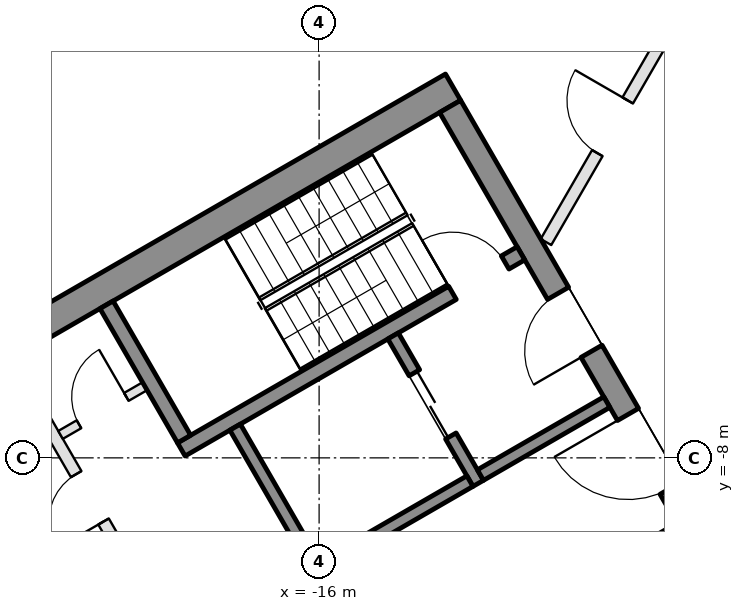
"""IFC4 building model, lengths in metres.
Left out: names, types, materials, properties, quantities, classifications, styles, units other than length and angle.
Written with IfcOpenShell. Run it as: python <this file> out.ifc"""

import sys

from ifc_helpers import new_model, si_unit, direction, frame, frame_2d, origin, place, context, subcontext, project, spatial, rectangle, extrude, element, fill, save


model = new_model("IFC4")
c1 = context("Model", 3, precision=1e-05, world=origin(), true_north=direction((0.0, 1.0)))
c2 = subcontext(c1, "Body", "Model", "MODEL_VIEW")
j1 = project(units=[si_unit("LENGTHUNIT", "METRE"), si_unit("PLANEANGLEUNIT", "RADIAN")], contexts=[c1])
p1 = place(None, origin())
s1 = spatial("IfcSite", under=j1, at=p1, CompositionType="ELEMENT")
p2 = place(p1, origin())
s2 = spatial("IfcBuilding", under=s1, at=p2, CompositionType="ELEMENT")
p3 = place(p2, frame((0.0, 0.0, 72.4)))
s3 = spatial("IfcBuildingStorey", under=s2, at=p3, CompositionType="ELEMENT", Elevation=72.4)
p4 = place(p3, frame((-20.309, 1.934, 0.0), z_axis=(0.0, 0.0, 1.0), x_axis=(-0.499992114976, -0.866029956157, 0.0)))
e1 = element("IfcWall", 1, at=p4, inside=s3, PredefinedType="SOLIDWALL", context=c2, shape_type="SweptSolid", body=[
    extrude(rectangle(XDim=6.74, YDim=0.35, at=frame_2d((3.37, 0.0))), origin(), (0.0, 0.0, 1.0), 3.55),
])
p5 = place(p4, frame((0.32, 0.0, 0.0)))
e2 = element("IfcOpeningElement", 2, at=p5, cuts=e1, PredefinedType="OPENING", context=c2, shape_type="SweptSolid", body=[
    extrude(rectangle(XDim=2.4, YDim=2.4, at=frame_2d((1.2, 1.2))), frame((0.0, 0.185, 0.0), z_axis=(0.0, -1.0, 0.0), x_axis=(1.0, 0.0, 0.0)), (0.0, 0.0, 1.0), 0.37),
])
p6 = place(p4, frame((3.02, 0.0, 0.3)))
e3 = element("IfcOpeningElement", 3, at=p6, cuts=e1, PredefinedType="OPENING", context=c2, shape_type="SweptSolid", body=[
    extrude(rectangle(XDim=1.5, YDim=2.65, at=frame_2d((0.75, 1.325))), frame((0.0, 0.185, 0.0), z_axis=(0.0, -1.0, 0.0), x_axis=(1.0, 0.0, 0.0)), (0.0, 0.0, 1.0), 0.37),
])
p7 = place(p4, frame((4.82, 0.0, 0.3)))
e4 = element("IfcOpeningElement", 4, at=p7, cuts=e1, PredefinedType="OPENING", context=c2, shape_type="SweptSolid", body=[
    extrude(rectangle(XDim=1.5, YDim=2.65, at=frame_2d((0.75, 1.325))), frame((0.0, 0.185, 0.0), z_axis=(0.0, -1.0, 0.0), x_axis=(1.0, 0.0, 0.0)), (0.0, 0.0, 1.0), 0.37),
])
p8 = place(p3, frame((-13.797, -1.903, 0.0), z_axis=(0.0, 0.0, 1.0), x_axis=(-0.866025009528, -0.500000682871, 0.0)))
e5 = element("IfcWall", 5, at=p8, inside=s3, PredefinedType="SHEAR", context=c2, shape_type="SweptSolid", body=[
    extrude(rectangle(XDim=14.837, YDim=0.5, at=frame_2d((7.418, 0.0))), origin(), (0.0, 0.0, 1.0), 3.5),
])
p9 = place(p3, frame((-13.845, -2.22, 0.0), z_axis=(0.0, 0.0, 1.0), x_axis=(0.500004234368, -0.866022959057, 0.0)))
e6 = element("IfcWall", 6, at=p9, inside=s3, PredefinedType="SHEAR", context=c2, shape_type="SweptSolid", body=[
    extrude(rectangle(XDim=10.0, YDim=0.4, at=frame_2d((5.0, 0.0))), origin(), (0.0, 0.0, 1.0), 3.5),
])
p10 = place(p9, frame((3.55, 0.0, 0.0)))
e7 = element("IfcOpeningElement", 7, at=p10, cuts=e6, PredefinedType="OPENING", context=c2, shape_type="SweptSolid", body=[
    extrude(rectangle(XDim=1.1, YDim=2.1, at=frame_2d((0.55, 1.05))), frame((0.0, 0.21, 0.0), z_axis=(0.0, -1.0, 0.0), x_axis=(1.0, 0.0, 0.0)), (0.0, 0.0, 1.0), 0.42),
])
p11 = place(p9, frame((5.85, 0.0, 0.0)))
e8 = element("IfcOpeningElement", 8, at=p11, cuts=e6, PredefinedType="OPENING", context=c2, shape_type="SweptSolid", body=[
    extrude(rectangle(XDim=1.4, YDim=2.1, at=frame_2d((0.7, 1.05))), frame((0.0, 0.21, 0.0), z_axis=(0.0, -1.0, 0.0), x_axis=(1.0, 0.0, 0.0)), (0.0, 0.0, 1.0), 0.42),
])
p12 = place(p3, frame((-12.681, -4.636, 0.0), z_axis=(0.0, 0.0, 1.0), x_axis=(-0.866021702275, -0.500006411147, 0.0)))
e9 = element("IfcWall", 9, at=p12, inside=s3, PredefinedType="SHEAR", context=c2, shape_type="SweptSolid", body=[
    extrude(rectangle(XDim=6.45, YDim=0.25, at=frame_2d((3.225, 0.0))), origin(), (0.0, 0.0, 1.0), 3.5),
])
p13 = place(p12, frame((0.3, 0.0, 0.0)))
e10 = element("IfcOpeningElement", 10, at=p13, cuts=e9, PredefinedType="OPENING", context=c2, shape_type="SweptSolid", body=[
    extrude(rectangle(XDim=1.0, YDim=2.1, at=frame_2d((0.5, 1.05))), frame((0.0, 0.135, 0.0), z_axis=(0.0, -1.0, 0.0), x_axis=(1.0, 0.0, 0.0)), (0.0, 0.0, 1.0), 0.27),
])
p14 = place(p3, frame((-19.496, -5.482, 0.0), z_axis=(0.0, 0.0, 1.0), x_axis=(0.499990435942, -0.866030925526, 0.0)))
e11 = element("IfcWall", 11, at=p14, inside=s3, PredefinedType="SHEAR", context=c2, shape_type="SweptSolid", body=[
    extrude(rectangle(XDim=2.55, YDim=0.25, at=frame_2d((1.275, 0.0))), origin(), (0.0, 0.0, 1.0), 3.5),
])
p15 = place(p3, frame((-17.381, -7.495, 0.0), z_axis=(0.0, 0.0, 1.0), x_axis=(0.500011755427, -0.866018616679, 0.0)))
e12 = element("IfcWall", 12, at=p15, inside=s3, PredefinedType="SHEAR", context=c2, shape_type="SweptSolid", body=[
    extrude(rectangle(XDim=2.8, YDim=0.2, at=frame_2d((1.4, 0.0))), origin(), (0.0, 0.0, 1.0), 3.5),
])
p16 = place(p3, frame((-14.783, -5.995, 0.0), z_axis=(0.0, 0.0, 1.0), x_axis=(0.49994636267, -0.866056369097, 0.0)))
e13 = element("IfcWall", 13, at=p16, inside=s3, PredefinedType="SHEAR", context=c2, shape_type="SweptSolid", body=[
    extrude(rectangle(XDim=2.8, YDim=0.2, at=frame_2d((1.4, 0.0))), origin(), (0.0, 0.0, 1.0), 3.5),
])
p17 = place(p16, frame((0.7, 0.0, 0.0)))
e14 = element("IfcOpeningElement", 14, at=p17, cuts=e13, PredefinedType="OPENING", context=c2, shape_type="SweptSolid", body=[
    extrude(rectangle(XDim=1.2, YDim=2.1, at=frame_2d((0.6, 1.05))), frame((0.0, 0.11, 0.0), z_axis=(0.0, -1.0, 0.0), x_axis=(1.0, 0.0, 0.0)), (0.0, 0.0, 1.0), 0.22),
])
p18 = place(p3, frame((-13.52, -8.383, 0.0), z_axis=(0.0, 0.0, 1.0), x_axis=(-0.866034573852, -0.49998411664, 0.0)))
e15 = element("IfcWall", 15, at=p18, inside=s3, PredefinedType="SHEAR", context=c2, shape_type="SweptSolid", body=[
    extrude(rectangle(XDim=2.8, YDim=0.2, at=frame_2d((1.4, 0.0))), origin(), (0.0, 0.0, 1.0), 3.5),
])
p19 = place(p3, frame((-11.268, -7.083, 0.0), z_axis=(0.0, 0.0, 1.0), x_axis=(-0.866050077142, -0.499957262057, 0.0)))
e16 = element("IfcWall", 16, at=p19, inside=s3, PredefinedType="SHEAR", context=c2, shape_type="SweptSolid", body=[
    extrude(rectangle(XDim=2.4, YDim=0.2, at=frame_2d((1.2, 0.0))), origin(), (0.0, 0.0, 1.0), 3.5),
])
p20 = place(p3, frame((-10.068, -9.162, 0.0), z_axis=(0.0, 0.0, 1.0), x_axis=(-0.866032725843, -0.499987317609, 0.0)))
e17 = element("IfcWall", 17, at=p20, inside=s3, PredefinedType="SHEAR", context=c2, shape_type="SweptSolid", body=[
    extrude(rectangle(XDim=10.16, YDim=0.2, at=frame_2d((5.08, 0.0))), origin(), (0.0, 0.0, 1.0), 3.5),
])
p21 = place(p20, frame((1.99, 0.0, 0.0)))
e18 = element("IfcOpeningElement", 18, at=p21, cuts=e17, PredefinedType="OPENING", context=c2, shape_type="SweptSolid", body=[
    extrude(rectangle(XDim=0.9, YDim=2.1, at=frame_2d((0.45, 1.05))), frame((0.0, 0.11, 0.0), z_axis=(0.0, -1.0, 0.0), x_axis=(1.0, 0.0, 0.0)), (0.0, 0.0, 1.0), 0.22),
])
p22 = place(p20, frame((7.07, 0.0, 0.0)))
e19 = element("IfcOpeningElement", 19, at=p22, cuts=e17, PredefinedType="OPENING", context=c2, shape_type="SweptSolid", body=[
    extrude(rectangle(XDim=0.9, YDim=2.1, at=frame_2d((0.45, 1.05))), frame((0.0, 0.11, 0.0), z_axis=(0.0, -1.0, 0.0), x_axis=(1.0, 0.0, 0.0)), (0.0, 0.0, 1.0), 0.22),
])
p23 = place(p3, frame((-21.076, -6.395, 0.0), z_axis=(0.0, 0.0, 1.0), x_axis=(0.50001468107, -0.866016927499, 0.0)))
e20 = element("IfcWall", 20, at=p23, inside=s3, PredefinedType="PARTITIONING", context=c2, shape_type="SweptSolid", body=[
    extrude(rectangle(XDim=5.4, YDim=0.2, at=frame_2d((2.7, 0.0))), origin(), (0.0, 0.0, 1.0), 3.5),
])
p24 = place(p23, frame((2.163, 0.0, 0.0)))
e21 = element("IfcOpeningElement", 21, at=p24, cuts=e20, PredefinedType="OPENING", context=c2, shape_type="SweptSolid", body=[
    extrude(rectangle(XDim=0.9, YDim=2.1, at=frame_2d((0.45, 1.05))), frame((0.0, 0.11, 0.0), z_axis=(0.0, -1.0, 0.0), x_axis=(1.0, 0.0, 0.0)), (0.0, 0.0, 1.0), 0.22),
])
p25 = place(p23, frame((4.038, 0.0, 0.0)))
e22 = element("IfcOpeningElement", 22, at=p25, cuts=e20, PredefinedType="OPENING", context=c2, shape_type="SweptSolid", body=[
    extrude(rectangle(XDim=0.9, YDim=2.1, at=frame_2d((0.45, 1.05))), frame((0.0, 0.11, 0.0), z_axis=(0.0, -1.0, 0.0), x_axis=(1.0, 0.0, 0.0)), (0.0, 0.0, 1.0), 0.22),
])
p26 = place(p3, frame((-18.866, -6.822, 0.0), z_axis=(0.0, 0.0, 1.0), x_axis=(-0.866028054938, -0.499995408039, 0.0)))
e23 = element("IfcWall", 23, at=p26, inside=s3, PredefinedType="PARTITIONING", context=c2, shape_type="SweptSolid", body=[
    extrude(rectangle(XDim=1.6, YDim=0.15, at=frame_2d((0.8, 0.0))), origin(), (0.0, 0.0, 1.0), 3.5),
])
p27 = place(p26, frame((0.35, 0.0, 0.0)))
e24 = element("IfcOpeningElement", 24, at=p27, cuts=e23, PredefinedType="OPENING", context=c2, shape_type="SweptSolid", body=[
    extrude(rectangle(XDim=0.9, YDim=2.1, at=frame_2d((0.45, 1.05))), frame((0.0, 0.085, 0.0), z_axis=(0.0, -1.0, 0.0), x_axis=(1.0, 0.0, 0.0)), (0.0, 0.0, 1.0), 0.17),
])
p28 = place(p3, frame((-12.269, -4.45, 0.0), z_axis=(0.0, 0.0, 1.0), x_axis=(0.499996027077, 0.86602769754, 0.0)))
e25 = element("IfcWall", 25, at=p28, inside=s3, PredefinedType="PARTITIONING", context=c2, shape_type="SweptSolid", body=[
    extrude(rectangle(XDim=4.377, YDim=0.2, at=frame_2d((2.189, 0.0))), origin(), (0.0, 0.0, 1.0), 2.95),
])
p29 = place(p28, frame((1.689, 0.0, 0.0)))
e26 = element("IfcOpeningElement", 26, at=p29, cuts=e25, PredefinedType="OPENING", context=c2, shape_type="SweptSolid", body=[
    extrude(rectangle(XDim=1.0, YDim=2.1, at=frame_2d((0.5, 1.05))), frame((0.0, 0.11, 0.0), z_axis=(0.0, -1.0, 0.0), x_axis=(1.0, 0.0, 0.0)), (0.0, 0.0, 1.0), 0.22),
])
p30 = place(p17, origin())
e27 = element("IfcDoor", 27, at=p30, inside=s3, OperationType="DOUBLE_DOOR_SLIDING", PredefinedType="DOOR", context=c2, shape_type="SweptSolid", body=[
    extrude(rectangle(XDim=1.2, YDim=2.1, at=frame_2d((0.6, 1.05))), frame((0.0, 0.025, 0.0), z_axis=(0.0, -1.0, 0.0), x_axis=(1.0, 0.0, 0.0)), (0.0, 0.0, 1.0), 0.05),
])
fill(e14, e27)
p31 = place(p27, frame((0.9, 0.0, 0.0), z_axis=(0.0, 0.0, 1.0), x_axis=(-1.0, 0.0, 0.0)))
e28 = element("IfcDoor", 28, at=p31, inside=s3, OperationType="SINGLE_SWING_RIGHT", PredefinedType="DOOR", context=c2, shape_type="SweptSolid", body=[
    extrude(rectangle(XDim=0.9, YDim=2.1, at=frame_2d((0.45, 1.05))), frame((0.0, 0.025, 0.0), z_axis=(0.0, -1.0, 0.0), x_axis=(1.0, 0.0, 0.0)), (0.0, 0.0, 1.0), 0.05),
])
fill(e24, e28)
p32 = place(p24, frame((0.9, 0.0, 0.0), z_axis=(0.0, 0.0, 1.0), x_axis=(-1.0, 0.0, 0.0)))
e29 = element("IfcDoor", 29, at=p32, inside=s3, OperationType="SINGLE_SWING_LEFT", PredefinedType="DOOR", context=c2, shape_type="SweptSolid", body=[
    extrude(rectangle(XDim=0.9, YDim=2.1, at=frame_2d((0.45, 1.05))), frame((0.0, 0.025, 0.0), z_axis=(0.0, -1.0, 0.0), x_axis=(1.0, 0.0, 0.0)), (0.0, 0.0, 1.0), 0.05),
])
fill(e21, e29)
p33 = place(p10, frame((1.1, 0.0, 0.0), z_axis=(0.0, 0.0, 1.0), x_axis=(-1.0, 0.0, 0.0)))
e30 = element("IfcDoor", 30, at=p33, inside=s3, OperationType="SINGLE_SWING_LEFT", PredefinedType="DOOR", context=c2, shape_type="SweptSolid", body=[
    extrude(rectangle(XDim=1.1, YDim=2.1, at=frame_2d((0.55, 1.05))), frame((0.0, 0.025, 0.0), z_axis=(0.0, -1.0, 0.0), x_axis=(1.0, 0.0, 0.0)), (0.0, 0.0, 1.0), 0.05),
])
fill(e7, e30)
p34 = place(p11, frame((1.4, 0.0, 0.0), z_axis=(0.0, 0.0, 1.0), x_axis=(-1.0, 0.0, 0.0)))
e31 = element("IfcDoor", 31, at=p34, inside=s3, OperationType="DOUBLE_DOOR_SINGLE_SWING", PredefinedType="DOOR", context=c2, shape_type="SweptSolid", body=[
    extrude(rectangle(XDim=1.4, YDim=2.1, at=frame_2d((0.7, 1.05))), frame((0.0, 0.025, 0.0), z_axis=(0.0, -1.0, 0.0), x_axis=(1.0, 0.0, 0.0)), (0.0, 0.0, 1.0), 0.05),
])
fill(e8, e31)
p35 = place(p13, frame((1.0, 0.0, 0.0), z_axis=(0.0, 0.0, 1.0), x_axis=(-1.0, 0.0, 0.0)))
e32 = element("IfcDoor", 32, at=p35, inside=s3, OperationType="SINGLE_SWING_LEFT", PredefinedType="DOOR", context=c2, shape_type="SweptSolid", body=[
    extrude(rectangle(XDim=1.0, YDim=2.1, at=frame_2d((0.5, 1.05))), frame((0.0, 0.025, 0.0), z_axis=(0.0, -1.0, 0.0), x_axis=(1.0, 0.0, 0.0)), (0.0, 0.0, 1.0), 0.05),
])
fill(e10, e32)
p36 = place(p29, origin())
e33 = element("IfcDoor", 33, at=p36, inside=s3, OperationType="SINGLE_SWING_RIGHT", PredefinedType="DOOR", context=c2, shape_type="SweptSolid", body=[
    extrude(rectangle(XDim=1.0, YDim=2.1, at=frame_2d((0.5, 1.05))), frame((0.0, 0.025, 0.0), z_axis=(0.0, -1.0, 0.0), x_axis=(1.0, 0.0, 0.0)), (0.0, 0.0, 1.0), 0.05),
])
fill(e26, e33)
save(model, sys.argv[1])
